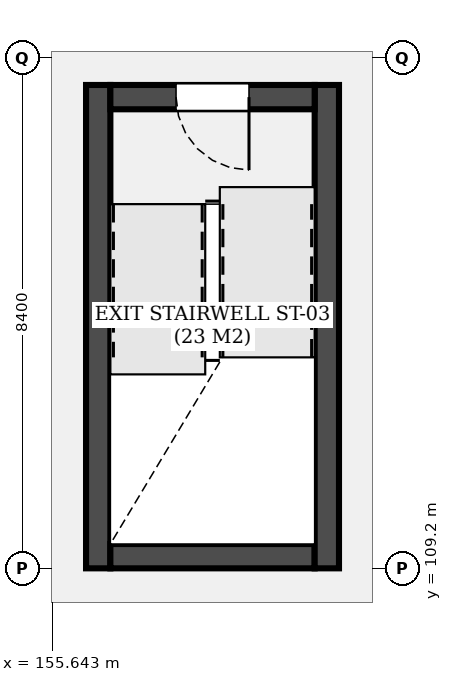
"""IFC4 building model, lengths in metres.
Left out: names, types, materials, properties, quantities, classifications, styles, units other than length and angle.
Written with IfcOpenShell. Run it as: python <this file> out.ifc"""

import sys

from ifc_helpers import new_model, si_unit, direction, frame, frame_2d, origin, place, context, subcontext, project, spatial, rectangle, extrude, element, fill, save


model = new_model("IFC4")
c1 = context("Model", 3, precision=1e-05, world=origin(), true_north=direction((0.0, 1.0)))
c2 = subcontext(c1, "Body", "Model", "MODEL_VIEW")
j1 = project(units=[si_unit("LENGTHUNIT", "METRE"), si_unit("PLANEANGLEUNIT", "RADIAN")], contexts=[c1])
p1 = place(None, origin())
s1 = spatial("IfcSite", under=j1, at=p1, CompositionType="ELEMENT")
p2 = place(p1, origin())
s2 = spatial("IfcBuilding", under=s1, at=p2, CompositionType="ELEMENT")
p3 = place(p2, frame((0.0, 0.0, 9.9)))
s3 = spatial("IfcBuildingStorey", under=s2, at=p3, CompositionType="ELEMENT", Elevation=9.9)
p4 = place(p3, frame((156.4, 117.15, 0.0), z_axis=(0.0, 0.0, 1.0), x_axis=(0.0, -1.0, 0.0)))
e1 = element("IfcWall", 1, at=p4, inside=s3, PredefinedType="SHEAR", context=c2, shape_type="SweptSolid", body=[
    extrude(rectangle(XDim=7.95, YDim=0.4, at=frame_2d((3.975, 0.0))), origin(), (0.0, 0.0, 1.0), 3.6),
])
p5 = place(p3, frame((156.6, 109.4, 0.0), z_axis=(0.0, 0.0, 1.0), x_axis=(1.0, 0.0, 0.0)))
e2 = element("IfcWall", 2, at=p5, inside=s3, PredefinedType="SHEAR", context=c2, shape_type="SweptSolid", body=[
    extrude(rectangle(XDim=3.36, YDim=0.4, at=frame_2d((1.68, 0.0))), origin(), (0.0, 0.0, 1.0), 3.6),
])
p6 = place(p3, frame((160.16, 109.2, 0.0), z_axis=(0.0, 0.0, 1.0), x_axis=(0.0, 1.0, 0.0)))
e3 = element("IfcWall", 3, at=p6, inside=s3, PredefinedType="SHEAR", context=c2, shape_type="SweptSolid", body=[
    extrude(rectangle(XDim=7.95, YDim=0.4, at=frame_2d((3.975, 0.0))), origin(), (0.0, 0.0, 1.0), 3.6),
])
p7 = place(p3, frame((159.96, 116.95, 0.0), z_axis=(0.0, 0.0, 1.0), x_axis=(-1.0, 0.0, 0.0)))
e4 = element("IfcWall", 4, at=p7, inside=s3, PredefinedType="SHEAR", context=c2, shape_type="SweptSolid", body=[
    extrude(rectangle(XDim=3.36, YDim=0.4, at=frame_2d((1.68, 0.0))), origin(), (0.0, 0.0, 1.0), 3.6),
])
p8 = place(p7, frame((1.08, 0.0, 0.0)))
e5 = element("IfcOpeningElement", 5, at=p8, cuts=e4, PredefinedType="OPENING", context=c2, shape_type="SweptSolid", body=[
    extrude(rectangle(XDim=1.2, YDim=2.2, at=frame_2d((0.6, 1.1))), frame((0.0, 0.21, 0.0), z_axis=(0.0, -1.0, 0.0), x_axis=(1.0, 0.0, 0.0)), (0.0, 0.0, 1.0), 0.42),
])
p9 = place(p8, origin())
e6 = element("IfcDoor", 6, at=p9, inside=s3, OperationType="SINGLE_SWING_LEFT", PredefinedType="DOOR", context=c2, shape_type="SweptSolid", body=[
    extrude(rectangle(XDim=1.2, YDim=2.2, at=frame_2d((0.6, 1.1))), frame((0.0, 0.025, 0.0), z_axis=(0.0, -1.0, 0.0), x_axis=(1.0, 0.0, 0.0)), (0.0, 0.0, 1.0), 0.05),
])
fill(e5, e6)
save(model, sys.argv[1])
